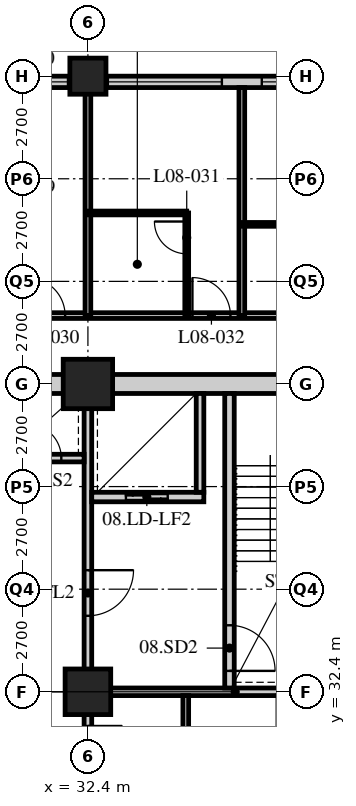
"""IFC4 building model, lengths in metres.
Left out: names, types, materials, properties, quantities, classifications, styles, units other than length and angle.
Written with IfcOpenShell. Run it as: python <this file> out.ifc"""

import sys

from ifc_helpers import new_model, si_unit, direction, frame, frame_2d, origin, origin_2d, place, context, subcontext, project, spatial, rectangle, hollow_rectangle, extrude, element, fill, save


model = new_model("IFC4")
c1 = context("Model", 3, precision=1e-05, world=origin(), true_north=direction((0.0, 1.0)))
c2 = subcontext(c1, "Body", "Model", "MODEL_VIEW")
j1 = project(units=[si_unit("LENGTHUNIT", "METRE"), si_unit("PLANEANGLEUNIT", "RADIAN")], contexts=[c1])
p1 = place(None, origin())
s1 = spatial("IfcSite", under=j1, at=p1, CompositionType="ELEMENT")
p2 = place(p1, origin())
s2 = spatial("IfcBuilding", under=s1, at=p2, CompositionType="ELEMENT")
p3 = place(p2, frame((0.0, 0.0, 39.8)))
s3 = spatial("IfcBuildingStorey", under=s2, at=p3, CompositionType="ELEMENT", Elevation=39.8)
p4 = place(p3, frame((32.4, 32.4, 0.0), z_axis=(0.0, 0.0, 1.0), x_axis=(1.0, 0.0, 0.0)))
e1 = element("IfcColumn", 1, at=p4, inside=s3, PredefinedType="COLUMN", context=c2, shape_type="SweptSolid", body=[
    extrude(hollow_rectangle(XDim=1.2, YDim=1.2, WallThickness=0.12, at=origin_2d()), origin(), (0.0, 0.0, 1.0), 3.4),
])
p5 = place(p3, frame((32.4, 40.5, 0.0), z_axis=(0.0, 0.0, 1.0), x_axis=(1.0, 0.0, 0.0)))
e2 = element("IfcColumn", 2, at=p5, inside=s3, PredefinedType="COLUMN", context=c2, shape_type="SweptSolid", body=[
    extrude(hollow_rectangle(XDim=1.3, YDim=1.3, WallThickness=0.13, at=origin_2d()), origin(), (0.0, 0.0, 1.0), 3.4),
])
p6 = place(p3, frame((32.4, 48.6, 0.0), z_axis=(0.0, 0.0, 1.0), x_axis=(1.0, 0.0, 0.0)))
e3 = element("IfcColumn", 3, at=p6, inside=s3, PredefinedType="COLUMN", context=c2, shape_type="SweptSolid", body=[
    extrude(hollow_rectangle(XDim=0.95, YDim=0.95, WallThickness=0.095, at=origin_2d()), origin(), (0.0, 0.0, 1.0), 3.4),
])
p7 = place(p3, frame((48.3, 48.45, 0.0), z_axis=(0.0, 0.0, 1.0), x_axis=(-1.0, 0.0, 0.0)))
e4 = element("IfcWall", 4, at=p7, inside=s3, PredefinedType="SOLIDWALL", context=c2, shape_type="SweptSolid", body=[
    extrude(rectangle(XDim=40.2, YDim=0.3, at=frame_2d((20.1, 0.0))), origin(), (0.0, 0.0, 1.0), 3.19),
])
p8 = place(p7, frame((0.225, 0.0, 0.9)))
e5 = element("IfcOpeningElement", 5, at=p8, cuts=e4, PredefinedType="OPENING", context=c2, shape_type="SweptSolid", body=[
    extrude(rectangle(XDim=3.0, YDim=2.0, at=frame_2d((1.5, 1.0))), frame((0.0, 0.16, 0.0), z_axis=(0.0, -1.0, 0.0), x_axis=(1.0, 0.0, 0.0)), (0.0, 0.0, 1.0), 0.32),
])
p9 = place(p7, frame((4.275, 0.0, 0.9)))
e6 = element("IfcOpeningElement", 6, at=p9, cuts=e4, PredefinedType="OPENING", context=c2, shape_type="SweptSolid", body=[
    extrude(rectangle(XDim=3.0, YDim=2.0, at=frame_2d((1.5, 1.0))), frame((0.0, 0.16, 0.0), z_axis=(0.0, -1.0, 0.0), x_axis=(1.0, 0.0, 0.0)), (0.0, 0.0, 1.0), 0.32),
])
p10 = place(p7, frame((8.325, 0.0, 0.9)))
e7 = element("IfcOpeningElement", 7, at=p10, cuts=e4, PredefinedType="OPENING", context=c2, shape_type="SweptSolid", body=[
    extrude(rectangle(XDim=3.0, YDim=2.0, at=frame_2d((1.5, 1.0))), frame((0.0, 0.16, 0.0), z_axis=(0.0, -1.0, 0.0), x_axis=(1.0, 0.0, 0.0)), (0.0, 0.0, 1.0), 0.32),
])
p11 = place(p7, frame((12.375, 0.0, 0.9)))
e8 = element("IfcOpeningElement", 8, at=p11, cuts=e4, PredefinedType="OPENING", context=c2, shape_type="SweptSolid", body=[
    extrude(rectangle(XDim=3.0, YDim=2.0, at=frame_2d((1.5, 1.0))), frame((0.0, 0.16, 0.0), z_axis=(0.0, -1.0, 0.0), x_axis=(1.0, 0.0, 0.0)), (0.0, 0.0, 1.0), 0.32),
])
p12 = place(p7, frame((16.425, 0.0, 0.9)))
e9 = element("IfcOpeningElement", 9, at=p12, cuts=e4, PredefinedType="OPENING", context=c2, shape_type="SweptSolid", body=[
    extrude(rectangle(XDim=3.0, YDim=2.0, at=frame_2d((1.5, 1.0))), frame((0.0, 0.16, 0.0), z_axis=(0.0, -1.0, 0.0), x_axis=(1.0, 0.0, 0.0)), (0.0, 0.0, 1.0), 0.32),
])
p13 = place(p7, frame((20.475, 0.0, 0.9)))
e10 = element("IfcOpeningElement", 10, at=p13, cuts=e4, PredefinedType="OPENING", context=c2, shape_type="SweptSolid", body=[
    extrude(rectangle(XDim=3.0, YDim=2.0, at=frame_2d((1.5, 1.0))), frame((0.0, 0.16, 0.0), z_axis=(0.0, -1.0, 0.0), x_axis=(1.0, 0.0, 0.0)), (0.0, 0.0, 1.0), 0.32),
])
p14 = place(p7, frame((24.525, 0.0, 0.9)))
e11 = element("IfcOpeningElement", 11, at=p14, cuts=e4, PredefinedType="OPENING", context=c2, shape_type="SweptSolid", body=[
    extrude(rectangle(XDim=3.0, YDim=2.0, at=frame_2d((1.5, 1.0))), frame((0.0, 0.16, 0.0), z_axis=(0.0, -1.0, 0.0), x_axis=(1.0, 0.0, 0.0)), (0.0, 0.0, 1.0), 0.32),
])
p15 = place(p7, frame((28.575, 0.0, 0.9)))
e12 = element("IfcOpeningElement", 12, at=p15, cuts=e4, PredefinedType="OPENING", context=c2, shape_type="SweptSolid", body=[
    extrude(rectangle(XDim=3.0, YDim=2.0, at=frame_2d((1.5, 1.0))), frame((0.0, 0.16, 0.0), z_axis=(0.0, -1.0, 0.0), x_axis=(1.0, 0.0, 0.0)), (0.0, 0.0, 1.0), 0.32),
])
p16 = place(p7, frame((32.625, 0.0, 0.9)))
e13 = element("IfcOpeningElement", 13, at=p16, cuts=e4, PredefinedType="OPENING", context=c2, shape_type="SweptSolid", body=[
    extrude(rectangle(XDim=3.0, YDim=2.0, at=frame_2d((1.5, 1.0))), frame((0.0, 0.16, 0.0), z_axis=(0.0, -1.0, 0.0), x_axis=(1.0, 0.0, 0.0)), (0.0, 0.0, 1.0), 0.32),
])
p17 = place(p7, frame((36.675, 0.0, 0.9)))
e14 = element("IfcOpeningElement", 14, at=p17, cuts=e4, PredefinedType="OPENING", context=c2, shape_type="SweptSolid", body=[
    extrude(rectangle(XDim=3.0, YDim=2.0, at=frame_2d((1.5, 1.0))), frame((0.0, 0.16, 0.0), z_axis=(0.0, -1.0, 0.0), x_axis=(1.0, 0.0, 0.0)), (0.0, 0.0, 1.0), 0.32),
])
p18 = place(p3, frame((12.15, 42.3, 0.0), z_axis=(0.0, 0.0, 1.0), x_axis=(1.0, 0.0, 0.0)))
e15 = element("IfcWall", 15, at=p18, inside=s3, PredefinedType="PARTITIONING", context=c2, shape_type="SweptSolid", body=[
    extrude(rectangle(XDim=32.4, YDim=0.15, at=frame_2d((16.2, 0.0))), origin(), (0.0, 0.0, 1.0), 3.19),
])
p19 = place(p18, frame((6.5, 0.0, 0.0)))
e16 = element("IfcOpeningElement", 16, at=p19, cuts=e15, PredefinedType="OPENING", context=c2, shape_type="SweptSolid", body=[
    extrude(rectangle(XDim=1.0, YDim=2.1, at=frame_2d((0.5, 1.05))), frame((0.0, 0.085, 0.0), z_axis=(0.0, -1.0, 0.0), x_axis=(1.0, 0.0, 0.0)), (0.0, 0.0, 1.0), 0.17),
])
p20 = place(p18, frame((8.4, 0.0, 0.0)))
e17 = element("IfcOpeningElement", 17, at=p20, cuts=e15, PredefinedType="OPENING", context=c2, shape_type="SweptSolid", body=[
    extrude(rectangle(XDim=1.0, YDim=2.1, at=frame_2d((0.5, 1.05))), frame((0.0, 0.085, 0.0), z_axis=(0.0, -1.0, 0.0), x_axis=(1.0, 0.0, 0.0)), (0.0, 0.0, 1.0), 0.17),
])
p21 = place(p18, frame((14.6, 0.0, 0.0)))
e18 = element("IfcOpeningElement", 18, at=p21, cuts=e15, PredefinedType="OPENING", context=c2, shape_type="SweptSolid", body=[
    extrude(rectangle(XDim=1.0, YDim=2.1, at=frame_2d((0.5, 1.05))), frame((0.0, 0.085, 0.0), z_axis=(0.0, -1.0, 0.0), x_axis=(1.0, 0.0, 0.0)), (0.0, 0.0, 1.0), 0.17),
])
p22 = place(p18, frame((18.65, 0.0, 0.0)))
e19 = element("IfcOpeningElement", 19, at=p22, cuts=e15, PredefinedType="OPENING", context=c2, shape_type="SweptSolid", body=[
    extrude(rectangle(XDim=1.0, YDim=2.1, at=frame_2d((0.5, 1.05))), frame((0.0, 0.085, 0.0), z_axis=(0.0, -1.0, 0.0), x_axis=(1.0, 0.0, 0.0)), (0.0, 0.0, 1.0), 0.17),
])
p23 = place(p18, frame((23.0, 0.0, 0.0)))
e20 = element("IfcOpeningElement", 20, at=p23, cuts=e15, PredefinedType="OPENING", context=c2, shape_type="SweptSolid", body=[
    extrude(rectangle(XDim=1.0, YDim=2.1, at=frame_2d((0.5, 1.05))), frame((0.0, 0.085, 0.0), z_axis=(0.0, -1.0, 0.0), x_axis=(1.0, 0.0, 0.0)), (0.0, 0.0, 1.0), 0.17),
])
p24 = place(p18, frame((26.75, 0.0, 0.0)))
e21 = element("IfcOpeningElement", 21, at=p24, cuts=e15, PredefinedType="OPENING", context=c2, shape_type="SweptSolid", body=[
    extrude(rectangle(XDim=1.0, YDim=2.1, at=frame_2d((0.5, 1.05))), frame((0.0, 0.085, 0.0), z_axis=(0.0, -1.0, 0.0), x_axis=(1.0, 0.0, 0.0)), (0.0, 0.0, 1.0), 0.17),
])
p25 = place(p18, frame((28.775, 0.0, 0.0)))
e22 = element("IfcOpeningElement", 22, at=p25, cuts=e15, PredefinedType="OPENING", context=c2, shape_type="SweptSolid", body=[
    extrude(rectangle(XDim=1.0, YDim=2.1, at=frame_2d((0.5, 1.05))), frame((0.0, 0.085, 0.0), z_axis=(0.0, -1.0, 0.0), x_axis=(1.0, 0.0, 0.0)), (0.0, 0.0, 1.0), 0.17),
])
p26 = place(p18, frame((2.625, 0.0, 0.0)))
e23 = element("IfcOpeningElement", 23, at=p26, cuts=e15, PredefinedType="OPENING", context=c2, shape_type="SweptSolid", body=[
    extrude(rectangle(XDim=1.0, YDim=2.1, at=frame_2d((0.5, 1.05))), frame((0.0, 0.085, 0.0), z_axis=(0.0, -1.0, 0.0), x_axis=(1.0, 0.0, 0.0)), (0.0, 0.0, 1.0), 0.17),
])
p27 = place(p3, frame((32.4, 42.3, 0.0), z_axis=(0.0, 0.0, 1.0), x_axis=(0.0, 1.0, 0.0)))
e24 = element("IfcWall", 24, at=p27, inside=s3, PredefinedType="PARTITIONING", context=c2, shape_type="SweptSolid", body=[
    extrude(rectangle(XDim=6.0, YDim=0.15, at=frame_2d((3.0, 0.0))), origin(), (0.0, 0.0, 1.0), 2.578),
])
p28 = place(p3, frame((32.4, 45.0, 0.0), z_axis=(0.0, 0.0, 1.0), x_axis=(1.0, 0.0, 0.0)))
e25 = element("IfcWall", 25, at=p28, inside=s3, PredefinedType="PARTITIONING", context=c2, shape_type="SweptSolid", body=[
    extrude(rectangle(XDim=2.6, YDim=0.1, at=frame_2d((1.3, 0.0))), origin(), (0.0, 0.0, 1.0), 3.19),
])
p29 = place(p3, frame((35.0, 42.3, 0.0), z_axis=(0.0, 0.0, 1.0), x_axis=(0.0, 1.0, 0.0)))
e26 = element("IfcWall", 26, at=p29, inside=s3, PredefinedType="PARTITIONING", context=c2, shape_type="SweptSolid", body=[
    extrude(rectangle(XDim=2.7, YDim=0.1, at=frame_2d((1.35, 0.0))), origin(), (0.0, 0.0, 1.0), 3.19),
])
p30 = place(p29, frame((1.625, 0.0, 0.0)))
e27 = element("IfcOpeningElement", 27, at=p30, cuts=e26, PredefinedType="OPENING", context=c2, shape_type="SweptSolid", body=[
    extrude(rectangle(XDim=0.85, YDim=2.1, at=frame_2d((0.425, 1.05))), frame((0.0, 0.06, 0.0), z_axis=(0.0, -1.0, 0.0), x_axis=(1.0, 0.0, 0.0)), (0.0, 0.0, 1.0), 0.12),
])
p31 = place(p3, frame((36.45, 42.3, 0.0), z_axis=(0.0, 0.0, 1.0), x_axis=(0.0, 1.0, 0.0)))
e28 = element("IfcWall", 28, at=p31, inside=s3, PredefinedType="PARTITIONING", context=c2, shape_type="SweptSolid", body=[
    extrude(rectangle(XDim=6.0, YDim=0.15, at=frame_2d((3.0, 0.0))), origin(), (0.0, 0.0, 1.0), 3.19),
])
p32 = place(p3, frame((36.45, 44.7, 0.0), z_axis=(0.0, 0.0, 1.0), x_axis=(1.0, 0.0, 0.0)))
e29 = element("IfcWall", 29, at=p32, inside=s3, PredefinedType="PARTITIONING", context=c2, shape_type="SweptSolid", body=[
    extrude(rectangle(XDim=2.3, YDim=0.1, at=frame_2d((1.15, 0.0))), origin(), (0.0, 0.0, 1.0), 3.19),
])
p33 = place(p3, frame((15.95, 40.5, 0.0), z_axis=(0.0, 0.0, 1.0), x_axis=(1.0, 0.0, 0.0)))
e30 = element("IfcWall", 30, at=p33, inside=s3, PredefinedType="SOLIDWALL", context=c2, shape_type="SweptSolid", body=[
    extrude(rectangle(XDim=24.8, YDim=0.5, at=frame_2d((12.4, 0.0))), origin(), (0.0, 0.0, 1.0), 2.54),
])
p34 = place(p33, frame((11.5, 0.0, 0.0)))
e31 = element("IfcOpeningElement", 31, at=p34, cuts=e30, PredefinedType="OPENING", context=c2, shape_type="SweptSolid", body=[
    extrude(rectangle(XDim=1.8, YDim=2.4, at=frame_2d((0.9, 1.2))), frame((0.0, 0.26, 0.0), z_axis=(0.0, -1.0, 0.0), x_axis=(1.0, 0.0, 0.0)), (0.0, 0.0, 1.0), 0.52),
])
p35 = place(p3, frame((32.3, 32.4, 0.0), z_axis=(0.0, 0.0, 1.0), x_axis=(1.0, 0.0, 0.0)))
e32 = element("IfcWall", 32, at=p35, inside=s3, PredefinedType="SOLIDWALL", context=c2, shape_type="SweptSolid", body=[
    extrude(rectangle(XDim=7.95, YDim=0.2, at=frame_2d((3.975, 0.0))), origin(), (0.0, 0.0, 1.0), 2.578),
])
p36 = place(p3, frame((32.4, 32.5, 0.0), z_axis=(0.0, 0.0, 1.0), x_axis=(0.0, 1.0, 0.0)))
e33 = element("IfcWall", 33, at=p36, inside=s3, PredefinedType="SOLIDWALL", context=c2, shape_type="SweptSolid", body=[
    extrude(rectangle(XDim=7.75, YDim=0.2, at=frame_2d((3.875, 0.0))), origin(), (0.0, 0.0, 1.0), 2.578),
])
p37 = place(p36, frame((1.9, 0.0, 0.0)))
e34 = element("IfcOpeningElement", 34, at=p37, cuts=e33, PredefinedType="OPENING", context=c2, shape_type="SweptSolid", body=[
    extrude(rectangle(XDim=1.2, YDim=2.1, at=frame_2d((0.6, 1.05))), frame((0.0, 0.11, 0.0), z_axis=(0.0, -1.0, 0.0), x_axis=(1.0, 0.0, 0.0)), (0.0, 0.0, 1.0), 0.22),
])
p38 = place(p3, frame((36.125, 32.5, 0.0), z_axis=(0.0, 0.0, 1.0), x_axis=(0.0, 1.0, 0.0)))
e35 = element("IfcWall", 35, at=p38, inside=s3, PredefinedType="SOLIDWALL", context=c2, shape_type="SweptSolid", body=[
    extrude(rectangle(XDim=7.75, YDim=0.25, at=frame_2d((3.875, 0.0))), origin(), (0.0, 0.0, 1.0), 3.19),
])
p39 = place(p38, frame((0.45, 0.0, 0.0)))
e36 = element("IfcOpeningElement", 36, at=p39, cuts=e35, PredefinedType="OPENING", context=c2, shape_type="SweptSolid", body=[
    extrude(rectangle(XDim=1.2, YDim=2.1, at=frame_2d((0.6, 1.05))), frame((0.0, 0.135, 0.0), z_axis=(0.0, -1.0, 0.0), x_axis=(1.0, 0.0, 0.0)), (0.0, 0.0, 1.0), 0.27),
])
p40 = place(p3, frame((32.5, 37.525, 0.0), z_axis=(0.0, 0.0, 1.0), x_axis=(1.0, 0.0, 0.0)))
e37 = element("IfcWall", 37, at=p40, inside=s3, PredefinedType="SOLIDWALL", context=c2, shape_type="SweptSolid", body=[
    extrude(rectangle(XDim=2.95, YDim=0.25, at=frame_2d((1.475, 0.0))), origin(), (0.0, 0.0, 1.0), 3.19),
])
p41 = place(p40, frame((0.9, 0.0, 0.0)))
e38 = element("IfcOpeningElement", 38, at=p41, cuts=e37, PredefinedType="OPENING", context=c2, shape_type="SweptSolid", body=[
    extrude(rectangle(XDim=1.1, YDim=2.4, at=frame_2d((0.55, 1.2))), frame((0.0, 0.135, 0.0), z_axis=(0.0, -1.0, 0.0), x_axis=(1.0, 0.0, 0.0)), (0.0, 0.0, 1.0), 0.27),
])
p42 = place(p3, frame((35.35, 37.65, 0.0), z_axis=(0.0, 0.0, 1.0), x_axis=(0.0, 1.0, 0.0)))
e39 = element("IfcWall", 39, at=p42, inside=s3, PredefinedType="SOLIDWALL", context=c2, shape_type="SweptSolid", body=[
    extrude(rectangle(XDim=2.6, YDim=0.2, at=frame_2d((1.3, 0.0))), origin(), (0.0, 0.0, 1.0), 3.19),
])
p43 = place(p3, frame((30.15, 38.55, 0.0), z_axis=(0.0, 0.0, 1.0), x_axis=(1.0, 0.0, 0.0)))
e40 = element("IfcWall", 40, at=p43, inside=s3, PredefinedType="SOLIDWALL", context=c2, shape_type="SweptSolid", body=[
    extrude(rectangle(XDim=2.15, YDim=0.2, at=frame_2d((1.075, 0.0))), origin(), (0.0, 0.0, 1.0), 3.19),
])
p44 = place(p43, frame((0.65, 0.0, 0.0)))
e41 = element("IfcOpeningElement", 41, at=p44, cuts=e40, PredefinedType="OPENING", context=c2, shape_type="SweptSolid", body=[
    extrude(rectangle(XDim=0.9, YDim=2.1, at=frame_2d((0.45, 1.05))), frame((0.0, 0.11, 0.0), z_axis=(0.0, -1.0, 0.0), x_axis=(1.0, 0.0, 0.0)), (0.0, 0.0, 1.0), 0.22),
])
p45 = place(p3, frame((32.4, 24.55, 0.0), z_axis=(0.0, 0.0, 1.0), x_axis=(0.0, 1.0, 0.0)))
e42 = element("IfcWall", 42, at=p45, inside=s3, PredefinedType="PARTITIONING", context=c2, shape_type="SweptSolid", body=[
    extrude(rectangle(XDim=7.75, YDim=0.2, at=frame_2d((3.875, 0.0))), origin(), (0.0, 0.0, 1.0), 2.578),
])
p46 = place(p45, frame((0.65, 0.0, 0.0)))
e43 = element("IfcOpeningElement", 43, at=p46, cuts=e42, PredefinedType="OPENING", context=c2, shape_type="SweptSolid", body=[
    extrude(rectangle(XDim=0.9, YDim=2.1, at=frame_2d((0.45, 1.05))), frame((0.0, 0.11, 0.0), z_axis=(0.0, -1.0, 0.0), x_axis=(1.0, 0.0, 0.0)), (0.0, 0.0, 1.0), 0.22),
])
p47 = place(p45, frame((2.15, 0.0, 0.0)))
e44 = element("IfcOpeningElement", 44, at=p47, cuts=e42, PredefinedType="OPENING", context=c2, shape_type="SweptSolid", body=[
    extrude(rectangle(XDim=0.9, YDim=2.1, at=frame_2d((0.45, 1.05))), frame((0.0, 0.11, 0.0), z_axis=(0.0, -1.0, 0.0), x_axis=(1.0, 0.0, 0.0)), (0.0, 0.0, 1.0), 0.22),
])
p48 = place(p45, frame((3.8, 0.0, 0.0)))
e45 = element("IfcOpeningElement", 45, at=p48, cuts=e42, PredefinedType="OPENING", context=c2, shape_type="SweptSolid", body=[
    extrude(rectangle(XDim=1.0, YDim=2.1, at=frame_2d((0.5, 1.05))), frame((0.0, 0.11, 0.0), z_axis=(0.0, -1.0, 0.0), x_axis=(1.0, 0.0, 0.0)), (0.0, 0.0, 1.0), 0.22),
])
p49 = place(p45, frame((6.05, 0.0, 0.0)))
e46 = element("IfcOpeningElement", 46, at=p49, cuts=e42, PredefinedType="OPENING", context=c2, shape_type="SweptSolid", body=[
    extrude(rectangle(XDim=0.9, YDim=2.1, at=frame_2d((0.45, 1.05))), frame((0.0, 0.11, 0.0), z_axis=(0.0, -1.0, 0.0), x_axis=(1.0, 0.0, 0.0)), (0.0, 0.0, 1.0), 0.22),
])
p50 = place(p3, frame((34.975, 28.05, 0.0), z_axis=(0.0, 0.0, 1.0), x_axis=(0.0, 1.0, 0.0)))
e47 = element("IfcWall", 47, at=p50, inside=s3, PredefinedType="PARTITIONING", context=c2, shape_type="SweptSolid", body=[
    extrude(rectangle(XDim=4.25, YDim=0.15, at=frame_2d((2.125, 0.0))), origin(), (0.0, 0.0, 1.0), 3.19),
])
p51 = place(p10, origin())
e48 = element("IfcWindow", 48, at=p51, inside=s3, PartitioningType="SINGLE_PANEL", PredefinedType="WINDOW", context=c2, shape_type="SweptSolid", body=[
    extrude(rectangle(XDim=3.0, YDim=2.0, at=frame_2d((1.5, 1.0))), frame((0.0, 0.03, 0.0), z_axis=(0.0, -1.0, 0.0), x_axis=(1.0, 0.0, 0.0)), (0.0, 0.0, 1.0), 0.06),
])
fill(e7, e48)
p52 = place(p11, origin())
e49 = element("IfcWindow", 49, at=p52, inside=s3, PartitioningType="SINGLE_PANEL", PredefinedType="WINDOW", context=c2, shape_type="SweptSolid", body=[
    extrude(rectangle(XDim=3.0, YDim=2.0, at=frame_2d((1.5, 1.0))), frame((0.0, 0.03, 0.0), z_axis=(0.0, -1.0, 0.0), x_axis=(1.0, 0.0, 0.0)), (0.0, 0.0, 1.0), 0.06),
])
fill(e8, e49)
p53 = place(p12, origin())
e50 = element("IfcWindow", 50, at=p53, inside=s3, PartitioningType="SINGLE_PANEL", PredefinedType="WINDOW", context=c2, shape_type="SweptSolid", body=[
    extrude(rectangle(XDim=3.0, YDim=2.0, at=frame_2d((1.5, 1.0))), frame((0.0, 0.03, 0.0), z_axis=(0.0, -1.0, 0.0), x_axis=(1.0, 0.0, 0.0)), (0.0, 0.0, 1.0), 0.06),
])
fill(e9, e50)
p54 = place(p22, origin())
e51 = element("IfcDoor", 51, at=p54, inside=s3, OperationType="SINGLE_SWING_LEFT", PredefinedType="DOOR", context=c2, shape_type="SweptSolid", body=[
    extrude(rectangle(XDim=1.0, YDim=2.1, at=frame_2d((0.5, 1.05))), frame((0.0, 0.025, 0.0), z_axis=(0.0, -1.0, 0.0), x_axis=(1.0, 0.0, 0.0)), (0.0, 0.0, 1.0), 0.05),
])
fill(e19, e51)
p55 = place(p30, origin())
e52 = element("IfcDoor", 52, at=p55, inside=s3, OperationType="SINGLE_SWING_RIGHT", PredefinedType="DOOR", context=c2, shape_type="SweptSolid", body=[
    extrude(rectangle(XDim=0.85, YDim=2.1, at=frame_2d((0.425, 1.05))), frame((0.0, 0.025, 0.0), z_axis=(0.0, -1.0, 0.0), x_axis=(1.0, 0.0, 0.0)), (0.0, 0.0, 1.0), 0.05),
])
fill(e27, e52)
p56 = place(p23, origin())
e53 = element("IfcDoor", 53, at=p56, inside=s3, OperationType="SINGLE_SWING_LEFT", PredefinedType="DOOR", context=c2, shape_type="SweptSolid", body=[
    extrude(rectangle(XDim=1.0, YDim=2.1, at=frame_2d((0.5, 1.05))), frame((0.0, 0.025, 0.0), z_axis=(0.0, -1.0, 0.0), x_axis=(1.0, 0.0, 0.0)), (0.0, 0.0, 1.0), 0.05),
])
fill(e20, e53)
p57 = place(p39, origin())
e54 = element("IfcDoor", 54, at=p57, inside=s3, OperationType="SINGLE_SWING_RIGHT", PredefinedType="DOOR", context=c2, shape_type="SweptSolid", body=[
    extrude(rectangle(XDim=1.2, YDim=2.1, at=frame_2d((0.6, 1.05))), frame((0.0, 0.025, 0.0), z_axis=(0.0, -1.0, 0.0), x_axis=(1.0, 0.0, 0.0)), (0.0, 0.0, 1.0), 0.05),
])
fill(e36, e54)
p58 = place(p37, origin())
e55 = element("IfcDoor", 55, at=p58, inside=s3, OperationType="SINGLE_SWING_LEFT", PredefinedType="DOOR", context=c2, shape_type="SweptSolid", body=[
    extrude(rectangle(XDim=1.2, YDim=2.1, at=frame_2d((0.6, 1.05))), frame((0.0, 0.025, 0.0), z_axis=(0.0, -1.0, 0.0), x_axis=(1.0, 0.0, 0.0)), (0.0, 0.0, 1.0), 0.05),
])
fill(e34, e55)
p59 = place(p44, origin())
e56 = element("IfcDoor", 56, at=p59, inside=s3, OperationType="SINGLE_SWING_LEFT", PredefinedType="DOOR", context=c2, shape_type="SweptSolid", body=[
    extrude(rectangle(XDim=0.9, YDim=2.1, at=frame_2d((0.45, 1.05))), frame((0.0, 0.025, 0.0), z_axis=(0.0, -1.0, 0.0), x_axis=(1.0, 0.0, 0.0)), (0.0, 0.0, 1.0), 0.05),
])
fill(e41, e56)
p60 = place(p41, origin())
e57 = element("IfcDoor", 57, at=p60, inside=s3, OperationType="DOUBLE_DOOR_SLIDING", PredefinedType="DOOR", context=c2, shape_type="SweptSolid", body=[
    extrude(rectangle(XDim=1.1, YDim=2.4, at=frame_2d((0.55, 1.2))), frame((0.0, 0.025, 0.0), z_axis=(0.0, -1.0, 0.0), x_axis=(1.0, 0.0, 0.0)), (0.0, 0.0, 1.0), 0.05),
])
fill(e38, e57)
save(model, sys.argv[1])
